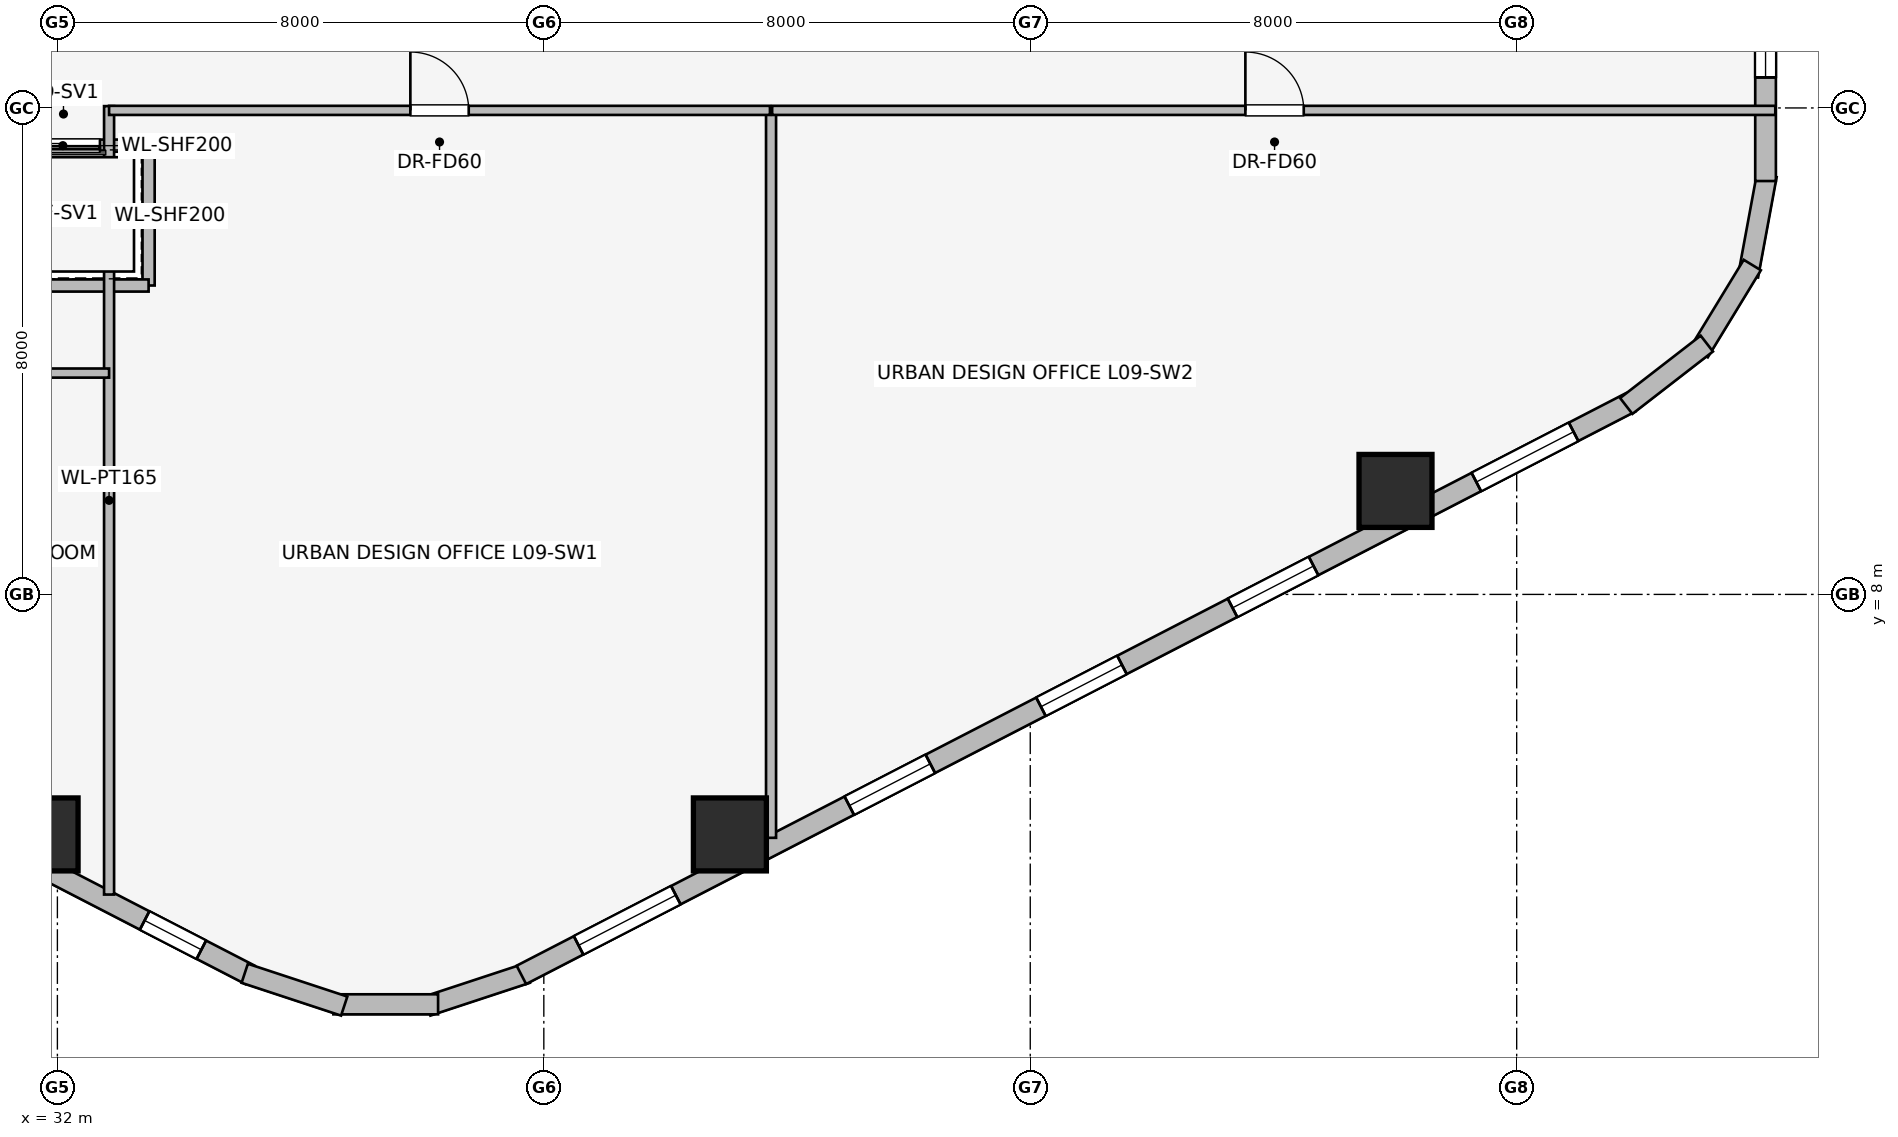
"""IFC4 building model, lengths in metres.
Left out: names, types, materials, properties, quantities, classifications, styles, units other than length and angle.
Written with IfcOpenShell. Run it as: python <this file> out.ifc"""

import sys

from ifc_helpers import new_model, si_unit, direction, frame, frame_2d, origin, origin_2d, place, context, subcontext, project, spatial, rectangle, extrude, element, fill, save


model = new_model("IFC4")
c1 = context("Model", 3, precision=1e-05, world=origin(), true_north=direction((0.0, 1.0)))
c2 = subcontext(c1, "Body", "Model", "MODEL_VIEW")
j1 = project(units=[si_unit("LENGTHUNIT", "METRE"), si_unit("PLANEANGLEUNIT", "RADIAN")], contexts=[c1])
p1 = place(None, origin())
s1 = spatial("IfcSite", under=j1, at=p1, CompositionType="ELEMENT")
p2 = place(p1, origin())
s2 = spatial("IfcBuilding", under=s1, at=p2, CompositionType="ELEMENT")
p3 = place(p2, frame((0.0, 0.0, 37.95)))
s3 = spatial("IfcBuildingStorey", under=s2, at=p3, CompositionType="ELEMENT", Elevation=37.95)
for number, where, z_axis, x_axis in (
    (1, (31.74, 4.053, 0.0), (0.0, 0.0, 1.0), (1.0, 0.0, 0.0)),
    (2, (43.06, 4.053, 0.0), (0.0, 0.0, 1.0), (1.0, 0.0, 0.0)),
    (3, (54.007, 9.702, 0.0), (0.0, 0.0, 1.0), (1.0, 0.0, 0.0)),
):
    element("IfcColumn", number, at=place(p3, frame(where, z_axis=z_axis, x_axis=x_axis)), inside=s3, PredefinedType="COLUMN", context=c2, shape_type="SweptSolid", body=[
        extrude(rectangle(XDim=1.2, YDim=1.2, at=origin_2d()), origin(), (0.0, 0.0, 1.0), 3.65),
    ])
p4 = place(p3, frame((35.169, 1.743, 0.0), z_axis=(0.0, 0.0, 1.0), x_axis=(-0.888634413993, 0.458616264721, 0.0)))
e4 = element("IfcWall", 4, at=p4, inside=s3, PredefinedType="STANDARD", context=c2, shape_type="SweptSolid", body=[
    extrude(rectangle(XDim=20.531, YDim=0.34, at=frame_2d((10.266, 0.0))), origin(), (0.0, 0.0, 1.0), 2.684),
])
p5 = place(p4, frame((9.716, 0.0, 0.0)))
e5 = element("IfcOpeningElement", 5, at=p5, cuts=e4, PredefinedType="OPENING", context=c2, shape_type="SweptSolid", body=[
    extrude(rectangle(XDim=1.1, YDim=2.04, at=frame_2d((0.55, 1.02))), frame((0.0, 0.18, 0.0), z_axis=(0.0, -1.0, 0.0), x_axis=(1.0, 0.0, 0.0)), (0.0, 0.0, 1.0), 0.36),
])
p6 = place(p4, frame((0.902, 0.0, 0.75)))
e6 = element("IfcOpeningElement", 6, at=p6, cuts=e4, PredefinedType="OPENING", context=c2, shape_type="SweptSolid", body=[
    extrude(rectangle(XDim=1.05, YDim=1.4, at=frame_2d((0.525, 0.7))), frame((0.0, 0.18, 0.0), z_axis=(0.0, -1.0, 0.0), x_axis=(1.0, 0.0, 0.0)), (0.0, 0.0, 1.0), 0.36),
])
p7 = place(p4, frame((5.234, 0.0, 0.75)))
e7 = element("IfcOpeningElement", 7, at=p7, cuts=e4, PredefinedType="OPENING", context=c2, shape_type="SweptSolid", body=[
    extrude(rectangle(XDim=1.5, YDim=1.5, at=frame_2d((0.75, 0.75))), frame((0.0, 0.18, 0.0), z_axis=(0.0, -1.0, 0.0), x_axis=(1.0, 0.0, 0.0)), (0.0, 0.0, 1.0), 0.36),
])
p8 = place(p4, frame((7.509, 0.0, 0.75)))
e8 = element("IfcOpeningElement", 8, at=p8, cuts=e4, PredefinedType="OPENING", context=c2, shape_type="SweptSolid", body=[
    extrude(rectangle(XDim=1.5, YDim=1.5, at=frame_2d((0.75, 0.75))), frame((0.0, 0.18, 0.0), z_axis=(0.0, -1.0, 0.0), x_axis=(1.0, 0.0, 0.0)), (0.0, 0.0, 1.0), 0.36),
])
p9 = place(p4, frame((11.373, 0.0, 0.75)))
e9 = element("IfcOpeningElement", 9, at=p9, cuts=e4, PredefinedType="OPENING", context=c2, shape_type="SweptSolid", body=[
    extrude(rectangle(XDim=1.8, YDim=1.5, at=frame_2d((0.9, 0.75))), frame((0.0, 0.18, 0.0), z_axis=(0.0, -1.0, 0.0), x_axis=(1.0, 0.0, 0.0)), (0.0, 0.0, 1.0), 0.36),
])
p10 = place(p4, frame((13.648, 0.0, 0.75)))
e10 = element("IfcOpeningElement", 10, at=p10, cuts=e4, PredefinedType="OPENING", context=c2, shape_type="SweptSolid", body=[
    extrude(rectangle(XDim=1.8, YDim=1.5, at=frame_2d((0.9, 0.75))), frame((0.0, 0.18, 0.0), z_axis=(0.0, -1.0, 0.0), x_axis=(1.0, 0.0, 0.0)), (0.0, 0.0, 1.0), 0.36),
])
p11 = place(p4, frame((17.823, 0.0, 0.75)))
e11 = element("IfcOpeningElement", 11, at=p11, cuts=e4, PredefinedType="OPENING", context=c2, shape_type="SweptSolid", body=[
    extrude(rectangle(XDim=1.5, YDim=1.5, at=frame_2d((0.75, 0.75))), frame((0.0, 0.18, 0.0), z_axis=(0.0, -1.0, 0.0), x_axis=(1.0, 0.0, 0.0)), (0.0, 0.0, 1.0), 0.36),
])
p12 = place(p3, frame((39.719, 1.769, 0.0), z_axis=(0.0, 0.0, 1.0), x_axis=(-0.94976901097, -0.312951794691, 0.0)))
e12 = element("IfcWall", 12, at=p12, inside=s3, PredefinedType="STANDARD", context=c2, shape_type="SweptSolid", body=[
    extrude(rectangle(XDim=1.722, YDim=0.33, at=frame_2d((0.861, 0.0))), origin(), (0.0, 0.0, 1.0), 3.39),
])
p13 = place(p3, frame((38.261, 1.259, 0.0), z_axis=(0.0, 0.0, 1.0), x_axis=(-1.0, 0.0, 0.0)))
e13 = element("IfcWall", 13, at=p13, inside=s3, PredefinedType="STANDARD", context=c2, shape_type="SweptSolid", body=[
    extrude(rectangle(XDim=1.722, YDim=0.33, at=frame_2d((0.861, 0.0))), origin(), (0.0, 0.0, 1.0), 3.39),
])
p14 = place(p3, frame((36.717, 1.23, 0.0), z_axis=(0.0, 0.0, 1.0), x_axis=(-0.94976901097, 0.312951794691, 0.0)))
e14 = element("IfcWall", 14, at=p14, inside=s3, PredefinedType="STANDARD", context=c2, shape_type="SweptSolid", body=[
    extrude(rectangle(XDim=1.722, YDim=0.33, at=frame_2d((0.861, 0.0))), origin(), (0.0, 0.0, 1.0), 3.39),
])
p15 = place(p3, frame((57.876, 11.159, 0.0), z_axis=(0.0, 0.0, 1.0), x_axis=(-0.888634413993, -0.458616264721, 0.0)))
e15 = element("IfcWall", 15, at=p15, inside=s3, PredefinedType="STANDARD", context=c2, shape_type="SweptSolid", body=[
    extrude(rectangle(XDim=20.531, YDim=0.34, at=frame_2d((10.266, 0.0))), origin(), (0.0, 0.0, 1.0), 2.684),
])
p16 = place(p15, frame((1.058, 0.0, 0.75)))
e16 = element("IfcOpeningElement", 16, at=p16, cuts=e15, PredefinedType="OPENING", context=c2, shape_type="SweptSolid", body=[
    extrude(rectangle(XDim=1.8, YDim=1.5, at=frame_2d((0.9, 0.75))), frame((0.0, 0.18, 0.0), z_axis=(0.0, -1.0, 0.0), x_axis=(1.0, 0.0, 0.0)), (0.0, 0.0, 1.0), 0.36),
])
p17 = place(p15, frame((5.87, 0.0, 0.75)))
e17 = element("IfcOpeningElement", 17, at=p17, cuts=e15, PredefinedType="OPENING", context=c2, shape_type="SweptSolid", body=[
    extrude(rectangle(XDim=1.5, YDim=1.5, at=frame_2d((0.75, 0.75))), frame((0.0, 0.18, 0.0), z_axis=(0.0, -1.0, 0.0), x_axis=(1.0, 0.0, 0.0)), (0.0, 0.0, 1.0), 0.36),
])
p18 = place(p15, frame((9.416, 0.0, 0.75)))
e18 = element("IfcOpeningElement", 18, at=p18, cuts=e15, PredefinedType="OPENING", context=c2, shape_type="SweptSolid", body=[
    extrude(rectangle(XDim=1.5, YDim=1.5, at=frame_2d((0.75, 0.75))), frame((0.0, 0.18, 0.0), z_axis=(0.0, -1.0, 0.0), x_axis=(1.0, 0.0, 0.0)), (0.0, 0.0, 1.0), 0.36),
])
p19 = place(p15, frame((12.963, 0.0, 0.75)))
e19 = element("IfcOpeningElement", 19, at=p19, cuts=e15, PredefinedType="OPENING", context=c2, shape_type="SweptSolid", body=[
    extrude(rectangle(XDim=1.5, YDim=1.5, at=frame_2d((0.75, 0.75))), frame((0.0, 0.18, 0.0), z_axis=(0.0, -1.0, 0.0), x_axis=(1.0, 0.0, 0.0)), (0.0, 0.0, 1.0), 0.36),
])
p20 = place(p15, frame((17.673, 0.0, 0.75)))
e20 = element("IfcOpeningElement", 20, at=p20, cuts=e15, PredefinedType="OPENING", context=c2, shape_type="SweptSolid", body=[
    extrude(rectangle(XDim=1.8, YDim=1.5, at=frame_2d((0.9, 0.75))), frame((0.0, 0.18, 0.0), z_axis=(0.0, -1.0, 0.0), x_axis=(1.0, 0.0, 0.0)), (0.0, 0.0, 1.0), 0.36),
])
p21 = place(p3, frame((60.113, 14.892, 0.0), z_axis=(0.0, 0.0, 1.0), x_axis=(-0.181714143354, -0.983351397063, 0.0)))
e21 = element("IfcWall", 21, at=p21, inside=s3, PredefinedType="STANDARD", context=c2, shape_type="SweptSolid", body=[
    extrude(rectangle(XDim=1.678, YDim=0.33, at=frame_2d((0.839, 0.0))), origin(), (0.0, 0.0, 1.0), 3.39),
])
p22 = place(p3, frame((59.875, 13.417, 0.0), z_axis=(0.0, 0.0, 1.0), x_axis=(-0.520584129191, -0.853810379671, 0.0)))
e22 = element("IfcWall", 22, at=p22, inside=s3, PredefinedType="STANDARD", context=c2, shape_type="SweptSolid", body=[
    extrude(rectangle(XDim=1.677, YDim=0.33, at=frame_2d((0.838, 0.0))), origin(), (0.0, 0.0, 1.0), 3.39),
])
p23 = place(p3, frame((59.127, 12.125, 0.0), z_axis=(0.0, 0.0, 1.0), x_axis=(-0.790691856293, -0.61221433207, 0.0)))
e23 = element("IfcWall", 23, at=p23, inside=s3, PredefinedType="STANDARD", context=c2, shape_type="SweptSolid", body=[
    extrude(rectangle(XDim=1.676, YDim=0.33, at=frame_2d((0.838, 0.0))), origin(), (0.0, 0.0, 1.0), 3.39),
])
p24 = place(p3, frame((60.093, 33.202, 0.0), z_axis=(0.0, 0.0, 1.0), x_axis=(0.0, -1.0, 0.0)))
e24 = element("IfcWall", 24, at=p24, inside=s3, PredefinedType="STANDARD", context=c2, shape_type="SweptSolid", body=[
    extrude(rectangle(XDim=18.404, YDim=0.34, at=frame_2d((9.202, 0.0))), origin(), (0.0, 0.0, 1.0), 2.684),
])
p25 = place(p24, frame((1.744, 0.0, 0.75)))
e25 = element("IfcOpeningElement", 25, at=p25, cuts=e24, PredefinedType="OPENING", context=c2, shape_type="SweptSolid", body=[
    extrude(rectangle(XDim=1.05, YDim=1.4, at=frame_2d((0.525, 0.7))), frame((0.0, 0.18, 0.0), z_axis=(0.0, -1.0, 0.0), x_axis=(1.0, 0.0, 0.0)), (0.0, 0.0, 1.0), 0.36),
])
p26 = place(p24, frame((5.125, 0.0, 0.75)))
e26 = element("IfcOpeningElement", 26, at=p26, cuts=e24, PredefinedType="OPENING", context=c2, shape_type="SweptSolid", body=[
    extrude(rectangle(XDim=1.5, YDim=1.5, at=frame_2d((0.75, 0.75))), frame((0.0, 0.18, 0.0), z_axis=(0.0, -1.0, 0.0), x_axis=(1.0, 0.0, 0.0)), (0.0, 0.0, 1.0), 0.36),
])
p27 = place(p24, frame((8.033, 0.0, 0.75)))
e27 = element("IfcOpeningElement", 27, at=p27, cuts=e24, PredefinedType="OPENING", context=c2, shape_type="SweptSolid", body=[
    extrude(rectangle(XDim=1.5, YDim=1.5, at=frame_2d((0.75, 0.75))), frame((0.0, 0.18, 0.0), z_axis=(0.0, -1.0, 0.0), x_axis=(1.0, 0.0, 0.0)), (0.0, 0.0, 1.0), 0.36),
])
p28 = place(p24, frame((11.572, 0.0, 0.75)))
e28 = element("IfcOpeningElement", 28, at=p28, cuts=e24, PredefinedType="OPENING", context=c2, shape_type="SweptSolid", body=[
    extrude(rectangle(XDim=1.8, YDim=1.5, at=frame_2d((0.9, 0.75))), frame((0.0, 0.18, 0.0), z_axis=(0.0, -1.0, 0.0), x_axis=(1.0, 0.0, 0.0)), (0.0, 0.0, 1.0), 0.36),
])
p29 = place(p24, frame((15.65, 0.0, 0.75)))
e29 = element("IfcOpeningElement", 29, at=p29, cuts=e24, PredefinedType="OPENING", context=c2, shape_type="SweptSolid", body=[
    extrude(rectangle(XDim=1.05, YDim=1.4, at=frame_2d((0.525, 0.7))), frame((0.0, 0.18, 0.0), z_axis=(0.0, -1.0, 0.0), x_axis=(1.0, 0.0, 0.0)), (0.0, 0.0, 1.0), 0.36),
])
p30 = place(p3, frame((33.5, 15.38, 0.0), z_axis=(0.0, 0.0, 1.0), x_axis=(-1.0, 0.0, 0.0)))
e30 = element("IfcWall", 30, at=p30, inside=s3, PredefinedType="PARTITIONING", context=c2, shape_type="SweptSolid", body=[
    extrude(rectangle(XDim=2.82, YDim=0.2, at=frame_2d((1.41, 0.0))), origin(), (0.0, 0.0, 1.0), 3.39),
])
p31 = place(p30, frame((0.8, 0.0, 0.0)))
e31 = element("IfcOpeningElement", 31, at=p31, cuts=e30, PredefinedType="OPENING", context=c2, shape_type="SweptSolid", body=[
    extrude(rectangle(XDim=1.2, YDim=2.2, at=frame_2d((0.6, 1.1))), frame((0.0, 0.11, 0.0), z_axis=(0.0, -1.0, 0.0), x_axis=(1.0, 0.0, 0.0)), (0.0, 0.0, 1.0), 0.22),
])
p32 = place(p3, frame((33.5, 13.08, 0.0), z_axis=(0.0, 0.0, 1.0), x_axis=(0.0, 1.0, 0.0)))
e32 = element("IfcWall", 32, at=p32, inside=s3, PredefinedType="PARTITIONING", context=c2, shape_type="SweptSolid", body=[
    extrude(rectangle(XDim=2.3, YDim=0.2, at=frame_2d((1.15, 0.0))), origin(), (0.0, 0.0, 1.0), 3.39),
])
p33 = place(p3, frame((30.879, 13.08, 0.0), z_axis=(0.0, 0.0, 1.0), x_axis=(1.0, 0.0, 0.0)))
e33 = element("IfcWall", 33, at=p33, inside=s3, PredefinedType="PARTITIONING", context=c2, shape_type="SweptSolid", body=[
    extrude(rectangle(XDim=2.621, YDim=0.2, at=frame_2d((1.311, 0.0))), origin(), (0.0, 0.0, 1.0), 3.39),
])
p34 = place(p3, frame((32.85, 3.064, 0.0), z_axis=(0.0, 0.0, 1.0), x_axis=(0.0, 1.0, 0.0)))
e34 = element("IfcWall", 34, at=p34, inside=s3, PredefinedType="PARTITIONING", context=c2, shape_type="SweptSolid", body=[
    extrude(rectangle(XDim=12.966, YDim=0.165, at=frame_2d((6.483, 0.0))), origin(), (0.0, 0.0, 1.0), 3.39),
])
p35 = place(p3, frame((16.487, 11.64, 0.0), z_axis=(0.0, 0.0, 1.0), x_axis=(1.0, 0.0, 0.0)))
e35 = element("IfcWall", 35, at=p35, inside=s3, PredefinedType="PARTITIONING", context=c2, shape_type="SweptSolid", body=[
    extrude(rectangle(XDim=16.363, YDim=0.15, at=frame_2d((8.182, 0.0))), origin(), (0.0, 0.0, 1.0), 3.39),
])
p36 = place(p35, frame((6.513, 0.0, 0.0)))
e36 = element("IfcOpeningElement", 36, at=p36, cuts=e35, PredefinedType="OPENING", context=c2, shape_type="SweptSolid", body=[
    extrude(rectangle(XDim=0.9, YDim=2.0, at=frame_2d((0.45, 1.0))), frame((0.0, 0.085, 0.0), z_axis=(0.0, -1.0, 0.0), x_axis=(1.0, 0.0, 0.0)), (0.0, 0.0, 1.0), 0.17),
])
p37 = place(p3, frame((43.737, 3.997, 0.0), z_axis=(0.0, 0.0, 1.0), x_axis=(0.0, 1.0, 0.0)))
e37 = element("IfcWall", 37, at=p37, inside=s3, PredefinedType="PARTITIONING", context=c2, shape_type="SweptSolid", body=[
    extrude(rectangle(XDim=11.933, YDim=0.165, at=frame_2d((5.966, 0.0))), origin(), (0.0, 0.0, 1.0), 3.39),
])
p38 = place(p3, frame((32.85, 15.96, 0.0), z_axis=(0.0, 0.0, 1.0), x_axis=(1.0, 0.0, 0.0)))
e38 = element("IfcWall", 38, at=p38, inside=s3, PredefinedType="PARTITIONING", context=c2, shape_type="SweptSolid", body=[
    extrude(rectangle(XDim=10.869, YDim=0.15, at=frame_2d((5.435, 0.0))), origin(), (0.0, 0.0, 1.0), 3.39),
])
p39 = place(p38, frame((4.955, 0.0, 0.0)))
e39 = element("IfcOpeningElement", 39, at=p39, cuts=e38, PredefinedType="OPENING", context=c2, shape_type="SweptSolid", body=[
    extrude(rectangle(XDim=0.96, YDim=2.0, at=frame_2d((0.48, 1.0))), frame((0.0, 0.085, 0.0), z_axis=(0.0, -1.0, 0.0), x_axis=(1.0, 0.0, 0.0)), (0.0, 0.0, 1.0), 0.17),
])
p40 = place(p3, frame((43.755, 15.96, 0.0), z_axis=(0.0, 0.0, 1.0), x_axis=(1.0, 0.0, 0.0)))
e40 = element("IfcWall", 40, at=p40, inside=s3, PredefinedType="PARTITIONING", context=c2, shape_type="SweptSolid", body=[
    extrude(rectangle(XDim=16.498, YDim=0.15, at=frame_2d((8.249, 0.0))), origin(), (0.0, 0.0, 1.0), 3.39),
])
p41 = place(p40, frame((7.783, 0.0, 0.0)))
e41 = element("IfcOpeningElement", 41, at=p41, cuts=e40, PredefinedType="OPENING", context=c2, shape_type="SweptSolid", body=[
    extrude(rectangle(XDim=0.96, YDim=2.0, at=frame_2d((0.48, 1.0))), frame((0.0, 0.085, 0.0), z_axis=(0.0, -1.0, 0.0), x_axis=(1.0, 0.0, 0.0)), (0.0, 0.0, 1.0), 0.17),
])
p42 = place(p6, origin())
e42 = element("IfcWindow", 42, at=p42, inside=s3, PartitioningType="SINGLE_PANEL", PredefinedType="WINDOW", context=c2, shape_type="SweptSolid", body=[
    extrude(rectangle(XDim=1.05, YDim=1.4, at=frame_2d((0.525, 0.7))), frame((0.0, 0.03, 0.0), z_axis=(0.0, -1.0, 0.0), x_axis=(1.0, 0.0, 0.0)), (0.0, 0.0, 1.0), 0.06),
])
fill(e6, e42)
p43 = place(p16, origin())
e43 = element("IfcWindow", 43, at=p43, inside=s3, PartitioningType="SINGLE_PANEL", PredefinedType="WINDOW", context=c2, shape_type="SweptSolid", body=[
    extrude(rectangle(XDim=1.8, YDim=1.5, at=frame_2d((0.9, 0.75))), frame((0.0, 0.03, 0.0), z_axis=(0.0, -1.0, 0.0), x_axis=(1.0, 0.0, 0.0)), (0.0, 0.0, 1.0), 0.06),
])
fill(e16, e43)
p44 = place(p17, origin())
e44 = element("IfcWindow", 44, at=p44, inside=s3, PartitioningType="SINGLE_PANEL", PredefinedType="WINDOW", context=c2, shape_type="SweptSolid", body=[
    extrude(rectangle(XDim=1.5, YDim=1.5, at=frame_2d((0.75, 0.75))), frame((0.0, 0.03, 0.0), z_axis=(0.0, -1.0, 0.0), x_axis=(1.0, 0.0, 0.0)), (0.0, 0.0, 1.0), 0.06),
])
fill(e17, e44)
p45 = place(p18, origin())
e45 = element("IfcWindow", 45, at=p45, inside=s3, PartitioningType="SINGLE_PANEL", PredefinedType="WINDOW", context=c2, shape_type="SweptSolid", body=[
    extrude(rectangle(XDim=1.5, YDim=1.5, at=frame_2d((0.75, 0.75))), frame((0.0, 0.03, 0.0), z_axis=(0.0, -1.0, 0.0), x_axis=(1.0, 0.0, 0.0)), (0.0, 0.0, 1.0), 0.06),
])
fill(e18, e45)
p46 = place(p19, origin())
e46 = element("IfcWindow", 46, at=p46, inside=s3, PartitioningType="SINGLE_PANEL", PredefinedType="WINDOW", context=c2, shape_type="SweptSolid", body=[
    extrude(rectangle(XDim=1.5, YDim=1.5, at=frame_2d((0.75, 0.75))), frame((0.0, 0.03, 0.0), z_axis=(0.0, -1.0, 0.0), x_axis=(1.0, 0.0, 0.0)), (0.0, 0.0, 1.0), 0.06),
])
fill(e19, e46)
p47 = place(p20, origin())
e47 = element("IfcWindow", 47, at=p47, inside=s3, PartitioningType="SINGLE_PANEL", PredefinedType="WINDOW", context=c2, shape_type="SweptSolid", body=[
    extrude(rectangle(XDim=1.8, YDim=1.5, at=frame_2d((0.9, 0.75))), frame((0.0, 0.03, 0.0), z_axis=(0.0, -1.0, 0.0), x_axis=(1.0, 0.0, 0.0)), (0.0, 0.0, 1.0), 0.06),
])
fill(e20, e47)
p48 = place(p29, origin())
e48 = element("IfcWindow", 48, at=p48, inside=s3, PartitioningType="SINGLE_PANEL", PredefinedType="WINDOW", context=c2, shape_type="SweptSolid", body=[
    extrude(rectangle(XDim=1.05, YDim=1.4, at=frame_2d((0.525, 0.7))), frame((0.0, 0.03, 0.0), z_axis=(0.0, -1.0, 0.0), x_axis=(1.0, 0.0, 0.0)), (0.0, 0.0, 1.0), 0.06),
])
fill(e29, e48)
p49 = place(p31, origin())
e49 = element("IfcDoor", 49, at=p49, inside=s3, OperationType="SLIDING_TO_RIGHT", PredefinedType="DOOR", context=c2, shape_type="SweptSolid", body=[
    extrude(rectangle(XDim=1.2, YDim=2.2, at=frame_2d((0.6, 1.1))), frame((0.0, 0.025, 0.0), z_axis=(0.0, -1.0, 0.0), x_axis=(1.0, 0.0, 0.0)), (0.0, 0.0, 1.0), 0.05),
])
fill(e31, e49)
p50 = place(p39, origin())
e50 = element("IfcDoor", 50, at=p50, inside=s3, OperationType="SINGLE_SWING_LEFT", PredefinedType="DOOR", context=c2, shape_type="SweptSolid", body=[
    extrude(rectangle(XDim=0.96, YDim=2.0, at=frame_2d((0.48, 1.0))), frame((0.0, 0.025, 0.0), z_axis=(0.0, -1.0, 0.0), x_axis=(1.0, 0.0, 0.0)), (0.0, 0.0, 1.0), 0.05),
])
fill(e39, e50)
p51 = place(p41, origin())
e51 = element("IfcDoor", 51, at=p51, inside=s3, OperationType="SINGLE_SWING_LEFT", PredefinedType="DOOR", context=c2, shape_type="SweptSolid", body=[
    extrude(rectangle(XDim=0.96, YDim=2.0, at=frame_2d((0.48, 1.0))), frame((0.0, 0.025, 0.0), z_axis=(0.0, -1.0, 0.0), x_axis=(1.0, 0.0, 0.0)), (0.0, 0.0, 1.0), 0.05),
])
fill(e41, e51)
save(model, sys.argv[1])
